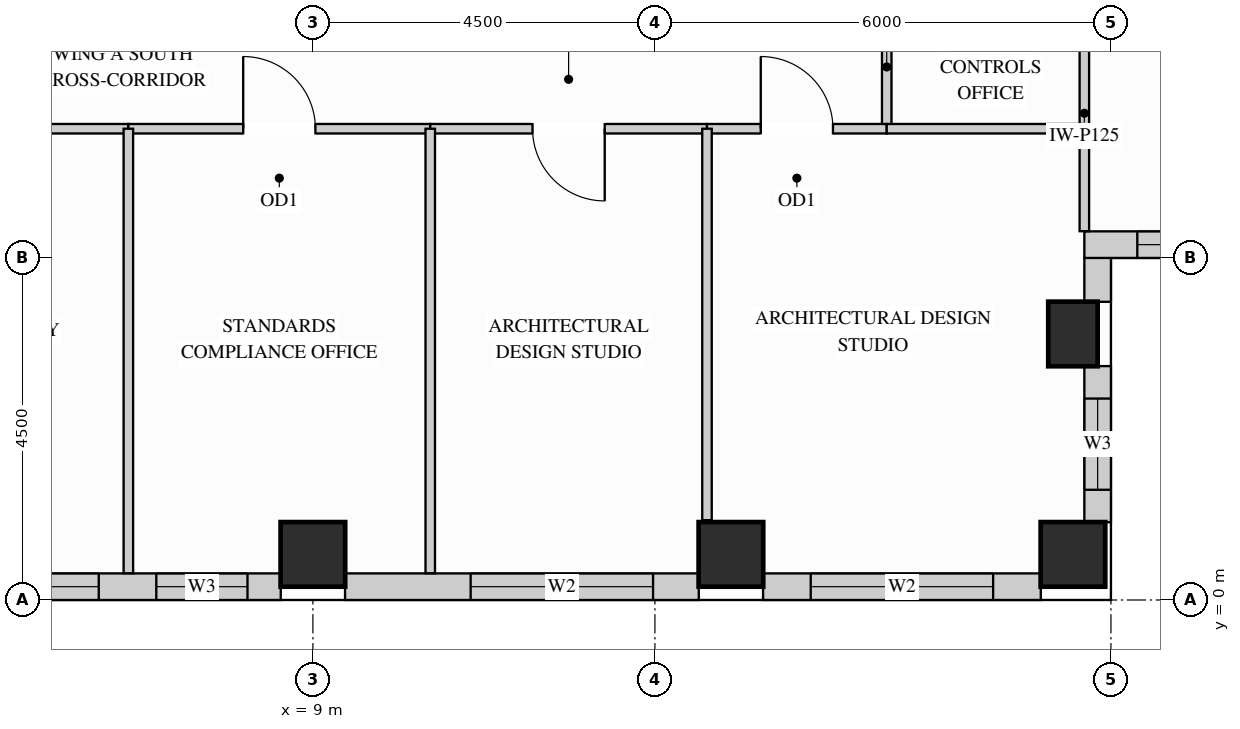
"""IFC4 building model, lengths in metres.
Left out: names, types, materials, properties, quantities, classifications, styles, units other than length and angle.
Written with IfcOpenShell. Run it as: python <this file> out.ifc"""

import sys

from ifc_helpers import new_model, si_unit, direction, frame, frame_2d, origin, origin_2d, place, context, subcontext, project, spatial, rectangle, extrude, source, transform, mapped, element, fill, save


model = new_model("IFC4")
c1 = context("Model", 3, precision=1e-05, world=origin(), true_north=direction((0.0, 1.0)))
c2 = subcontext(c1, "Body", "Model", "MODEL_VIEW")
j1 = project(units=[si_unit("LENGTHUNIT", "METRE"), si_unit("PLANEANGLEUNIT", "RADIAN")], contexts=[c1])
p1 = place(None, origin())
s1 = spatial("IfcSite", under=j1, at=p1, CompositionType="ELEMENT")
p2 = place(p1, origin())
s2 = spatial("IfcBuilding", under=s1, at=p2, CompositionType="ELEMENT")
p3 = place(p2, frame((0.0, 0.0, 219.6)))
s3 = spatial("IfcBuildingStorey", under=s2, at=p3, CompositionType="ELEMENT", Elevation=219.6)
m1 = source(origin(), c2, "Body", "SweptSolid", [
    extrude(rectangle(XDim=0.65, YDim=0.85, at=origin_2d()), origin(), (0.0, 0.0, 1.0), 3.4),
])
p4 = place(p3, frame((19.0, 3.5, 0.0), z_axis=(0.0, 0.0, 1.0), x_axis=(1.0, 0.0, 0.0)))
e1 = element("IfcColumn", 1, at=p4, inside=s3, PredefinedType="COLUMN", context=c2, shape_type="MappedRepresentation", body=[
    mapped(m1, transform((0.0, 0.0, 0.0), x_axis=(1.0, 0.0, 0.0), y_axis=(0.0, 1.0, 0.0), z_axis=(0.0, 0.0, 1.0))),
])
m2 = source(origin(), c2, "Body", "SweptSolid", [
    extrude(rectangle(XDim=0.85, YDim=0.85, at=origin_2d()), origin(), (0.0, 0.0, 1.0), 3.4),
])
for number, where, z_axis, x_axis in (
    (2, (14.5, 0.6, 0.0), (0.0, 0.0, 1.0), (1.0, 0.0, 0.0)),
    (3, (19.0, 0.6, 0.0), (0.0, 0.0, 1.0), (1.0, 0.0, 0.0)),
    (4, (9.0, 0.6, 0.0), (0.0, 0.0, 1.0), (1.0, 0.0, 0.0)),
):
    element("IfcColumn", number, at=place(p3, frame(where, z_axis=z_axis, x_axis=x_axis)), inside=s3, PredefinedType="COLUMN", context=c2, shape_type="MappedRepresentation", body=[
        mapped(m2, transform((0.0, 0.0, 0.0), x_axis=(1.0, 0.0, 0.0), y_axis=(0.0, 1.0, 0.0), z_axis=(0.0, 0.0, 1.0))),
    ])
p5 = place(p3, frame((3.923, 0.175, 0.0), z_axis=(0.0, 0.0, 1.0), x_axis=(1.0, 0.0, 0.0)))
e5 = element("IfcWall", 5, at=p5, inside=s3, PredefinedType="SOLIDWALL", context=c2, shape_type="SweptSolid", body=[
    extrude(rectangle(XDim=4.654, YDim=0.35, at=frame_2d((2.327, 0.0))), origin(), (0.0, 0.0, 1.0), 3.385),
])
p6 = place(p5, frame((0.459, 0.0, 0.78)))
e6 = element("IfcOpeningElement", 6, at=p6, cuts=e5, PredefinedType="OPENING", context=c2, shape_type="SweptSolid", body=[
    extrude(rectangle(XDim=1.8, YDim=2.1, at=frame_2d((0.9, 1.05))), frame((0.0, 0.185, 0.0), z_axis=(0.0, -1.0, 0.0), x_axis=(1.0, 0.0, 0.0)), (0.0, 0.0, 1.0), 0.37),
])
p7 = place(p5, frame((3.017, 0.0, 0.78)))
e7 = element("IfcOpeningElement", 7, at=p7, cuts=e5, PredefinedType="OPENING", context=c2, shape_type="SweptSolid", body=[
    extrude(rectangle(XDim=1.2, YDim=2.1, at=frame_2d((0.6, 1.05))), frame((0.0, 0.185, 0.0), z_axis=(0.0, -1.0, 0.0), x_axis=(1.0, 0.0, 0.0)), (0.0, 0.0, 1.0), 0.37),
])
p8 = place(p3, frame((9.423, 0.175, 0.0), z_axis=(0.0, 0.0, 1.0), x_axis=(1.0, 0.0, 0.0)))
e8 = element("IfcWall", 8, at=p8, inside=s3, PredefinedType="SOLIDWALL", context=c2, shape_type="SweptSolid", body=[
    extrude(rectangle(XDim=4.654, YDim=0.35, at=frame_2d((2.327, 0.0))), origin(), (0.0, 0.0, 1.0), 3.385),
])
p9 = place(p8, frame((1.653, 0.0, 0.78)))
e9 = element("IfcOpeningElement", 9, at=p9, cuts=e8, PredefinedType="OPENING", context=c2, shape_type="SweptSolid", body=[
    extrude(rectangle(XDim=2.4, YDim=2.1, at=frame_2d((1.2, 1.05))), frame((0.0, 0.185, 0.0), z_axis=(0.0, -1.0, 0.0), x_axis=(1.0, 0.0, 0.0)), (0.0, 0.0, 1.0), 0.37),
])
p10 = place(p3, frame((14.923, 0.175, 0.0), z_axis=(0.0, 0.0, 1.0), x_axis=(1.0, 0.0, 0.0)))
e10 = element("IfcWall", 10, at=p10, inside=s3, PredefinedType="SOLIDWALL", context=c2, shape_type="SweptSolid", body=[
    extrude(rectangle(XDim=3.654, YDim=0.35, at=frame_2d((1.827, 0.0))), origin(), (0.0, 0.0, 1.0), 3.385),
])
p11 = place(p10, frame((0.627, 0.0, 0.78)))
e11 = element("IfcOpeningElement", 11, at=p11, cuts=e10, PredefinedType="OPENING", context=c2, shape_type="SweptSolid", body=[
    extrude(rectangle(XDim=2.4, YDim=2.1, at=frame_2d((1.2, 1.05))), frame((0.0, 0.185, 0.0), z_axis=(0.0, -1.0, 0.0), x_axis=(1.0, 0.0, 0.0)), (0.0, 0.0, 1.0), 0.37),
])
p12 = place(p3, frame((19.325, 1.023, 0.0), z_axis=(0.0, 0.0, 1.0), x_axis=(0.0, 1.0, 0.0)))
e12 = element("IfcWall", 12, at=p12, inside=s3, PredefinedType="SOLIDWALL", context=c2, shape_type="SweptSolid", body=[
    extrude(rectangle(XDim=2.054, YDim=0.35, at=frame_2d((1.027, 0.0))), origin(), (0.0, 0.0, 1.0), 2.619),
])
p13 = place(p12, frame((0.427, 0.0, 0.78)))
e13 = element("IfcOpeningElement", 13, at=p13, cuts=e12, PredefinedType="OPENING", context=c2, shape_type="SweptSolid", body=[
    extrude(rectangle(XDim=1.2, YDim=1.659, at=frame_2d((0.6, 0.83))), frame((0.0, 0.185, 0.0), z_axis=(0.0, -1.0, 0.0), x_axis=(1.0, 0.0, 0.0)), (0.0, 0.0, 1.0), 0.37),
])
m3 = source(origin(), c2, "Body", "SweptSolid", [
    extrude(rectangle(XDim=0.579, YDim=0.35, at=frame_2d((0.29, 0.0))), origin(), (0.0, 0.0, 1.0), 2.773),
])
p14 = place(p3, frame((19.325, 3.923, 0.0), z_axis=(0.0, 0.0, 1.0), x_axis=(0.0, 1.0, 0.0)))
e14 = element("IfcWall", 14, at=p14, inside=s3, PredefinedType="SOLIDWALL", context=c2, shape_type="MappedRepresentation", body=[
    mapped(m3, transform((0.0, 0.0, 0.0), x_axis=(1.0, 0.0, 0.0), y_axis=(0.0, 1.0, 0.0), z_axis=(0.0, 0.0, 1.0))),
])
p15 = place(p3, frame((19.15, 4.675, 0.0), z_axis=(0.0, 0.0, 1.0), x_axis=(1.0, 0.0, 0.0)))
e15 = element("IfcWall", 15, at=p15, inside=s3, PredefinedType="SOLIDWALL", context=c2, shape_type="SweptSolid", body=[
    extrude(rectangle(XDim=15.6, YDim=0.35, at=frame_2d((7.8, 0.0))), origin(), (0.0, 0.0, 1.0), 3.385),
])
p16 = place(p15, frame((0.697, 0.0, 0.78)))
e16 = element("IfcOpeningElement", 16, at=p16, cuts=e15, PredefinedType="OPENING", context=c2, shape_type="SweptSolid", body=[
    extrude(rectangle(XDim=1.5, YDim=2.0, at=frame_2d((0.75, 1.0))), frame((0.0, 0.185, 0.0), z_axis=(0.0, -1.0, 0.0), x_axis=(1.0, 0.0, 0.0)), (0.0, 0.0, 1.0), 0.37),
])
p17 = place(p15, frame((2.573, 0.0, 0.78)))
e17 = element("IfcOpeningElement", 17, at=p17, cuts=e15, PredefinedType="OPENING", context=c2, shape_type="SweptSolid", body=[
    extrude(rectangle(XDim=1.5, YDim=2.0, at=frame_2d((0.75, 1.0))), frame((0.0, 0.185, 0.0), z_axis=(0.0, -1.0, 0.0), x_axis=(1.0, 0.0, 0.0)), (0.0, 0.0, 1.0), 0.37),
])
p18 = place(p15, frame((5.783, 0.0, 0.78)))
e18 = element("IfcOpeningElement", 18, at=p18, cuts=e15, PredefinedType="OPENING", context=c2, shape_type="SweptSolid", body=[
    extrude(rectangle(XDim=1.5, YDim=2.0, at=frame_2d((0.75, 1.0))), frame((0.0, 0.185, 0.0), z_axis=(0.0, -1.0, 0.0), x_axis=(1.0, 0.0, 0.0)), (0.0, 0.0, 1.0), 0.37),
])
p19 = place(p15, frame((8.117, 0.0, 0.78)))
e19 = element("IfcOpeningElement", 19, at=p19, cuts=e15, PredefinedType="OPENING", context=c2, shape_type="SweptSolid", body=[
    extrude(rectangle(XDim=1.5, YDim=2.0, at=frame_2d((0.75, 1.0))), frame((0.0, 0.185, 0.0), z_axis=(0.0, -1.0, 0.0), x_axis=(1.0, 0.0, 0.0)), (0.0, 0.0, 1.0), 0.37),
])
p20 = place(p15, frame((11.393, 0.0, 0.78)))
e20 = element("IfcOpeningElement", 20, at=p20, cuts=e15, PredefinedType="OPENING", context=c2, shape_type="SweptSolid", body=[
    extrude(rectangle(XDim=1.5, YDim=2.0, at=frame_2d((0.75, 1.0))), frame((0.0, 0.185, 0.0), z_axis=(0.0, -1.0, 0.0), x_axis=(1.0, 0.0, 0.0)), (0.0, 0.0, 1.0), 0.37),
])
p21 = place(p15, frame((13.337, 0.0, 0.78)))
e21 = element("IfcOpeningElement", 21, at=p21, cuts=e15, PredefinedType="OPENING", context=c2, shape_type="SweptSolid", body=[
    extrude(rectangle(XDim=1.5, YDim=2.0, at=frame_2d((0.75, 1.0))), frame((0.0, 0.185, 0.0), z_axis=(0.0, -1.0, 0.0), x_axis=(1.0, 0.0, 0.0)), (0.0, 0.0, 1.0), 0.37),
])
m4 = source(origin(), c2, "Body", "SweptSolid", [
    extrude(rectangle(XDim=3.198, YDim=0.125, at=frame_2d((1.599, 0.0))), origin(), (0.0, 0.0, 1.0), 2.773),
])
p22 = place(p3, frame((19.15, 4.852, 0.0), z_axis=(0.0, 0.0, 1.0), x_axis=(0.0, 1.0, 0.0)))
e22 = element("IfcWall", 22, at=p22, inside=s3, PredefinedType="PARTITIONING", context=c2, shape_type="MappedRepresentation", body=[
    mapped(m4, transform((0.0, 0.0, 0.0), x_axis=(1.0, 0.0, 0.0), y_axis=(0.0, 1.0, 0.0), z_axis=(0.0, 0.0, 1.0))),
])
p23 = place(p3, frame((16.55, 6.2, 0.0), z_axis=(0.0, 0.0, 1.0), x_axis=(0.0, 1.0, 0.0)))
e23 = element("IfcWall", 23, at=p23, inside=s3, PredefinedType="PARTITIONING", context=c2, shape_type="SweptSolid", body=[
    extrude(rectangle(XDim=4.4, YDim=0.125, at=frame_2d((2.2, 0.0))), origin(), (0.0, 0.0, 1.0), 3.385),
])
p24 = place(p23, frame((1.725, 0.0, 0.0)))
e24 = element("IfcOpeningElement", 24, at=p24, cuts=e23, PredefinedType="OPENING", context=c2, shape_type="SweptSolid", body=[
    extrude(rectangle(XDim=0.95, YDim=2.15, at=frame_2d((0.475, 1.075))), frame((0.0, 0.073, 0.0), z_axis=(0.0, -1.0, 0.0), x_axis=(1.0, 0.0, 0.0)), (0.0, 0.0, 1.0), 0.145),
])
p25 = place(p3, frame((2.45, 6.2, 0.0), z_axis=(0.0, 0.0, 1.0), x_axis=(1.0, 0.0, 0.0)))
e25 = element("IfcWall", 25, at=p25, inside=s3, PredefinedType="PARTITIONING", context=c2, shape_type="SweptSolid", body=[
    extrude(rectangle(XDim=4.122, YDim=0.125, at=frame_2d((2.061, 0.0))), origin(), (0.0, 0.0, 1.0), 2.848),
])
p26 = place(p25, frame((1.586, 0.0, 0.0)))
e26 = element("IfcOpeningElement", 26, at=p26, cuts=e25, PredefinedType="OPENING", context=c2, shape_type="SweptSolid", body=[
    extrude(rectangle(XDim=0.95, YDim=2.15, at=frame_2d((0.475, 1.075))), frame((0.0, 0.073, 0.0), z_axis=(0.0, -1.0, 0.0), x_axis=(1.0, 0.0, 0.0)), (0.0, 0.0, 1.0), 0.145),
])
p27 = place(p3, frame((6.572, 6.2, 0.0), z_axis=(0.0, 0.0, 1.0), x_axis=(1.0, 0.0, 0.0)))
e27 = element("IfcWall", 27, at=p27, inside=s3, PredefinedType="PARTITIONING", context=c2, shape_type="SweptSolid", body=[
    extrude(rectangle(XDim=3.972, YDim=0.125, at=frame_2d((1.986, 0.0))), origin(), (0.0, 0.0, 1.0), 2.848),
])
p28 = place(p27, frame((1.511, 0.0, 0.0)))
e28 = element("IfcOpeningElement", 28, at=p28, cuts=e27, PredefinedType="OPENING", context=c2, shape_type="SweptSolid", body=[
    extrude(rectangle(XDim=0.95, YDim=2.15, at=frame_2d((0.475, 1.075))), frame((0.0, 0.073, 0.0), z_axis=(0.0, -1.0, 0.0), x_axis=(1.0, 0.0, 0.0)), (0.0, 0.0, 1.0), 0.145),
])
p29 = place(p3, frame((10.544, 6.2, 0.0), z_axis=(0.0, 0.0, 1.0), x_axis=(1.0, 0.0, 0.0)))
e29 = element("IfcWall", 29, at=p29, inside=s3, PredefinedType="PARTITIONING", context=c2, shape_type="SweptSolid", body=[
    extrude(rectangle(XDim=3.641, YDim=0.125, at=frame_2d((1.821, 0.0))), origin(), (0.0, 0.0, 1.0), 2.848),
])
p30 = place(p29, frame((1.345, 0.0, 0.0)))
e30 = element("IfcOpeningElement", 30, at=p30, cuts=e29, PredefinedType="OPENING", context=c2, shape_type="SweptSolid", body=[
    extrude(rectangle(XDim=0.95, YDim=2.15, at=frame_2d((0.475, 1.075))), frame((0.0, 0.073, 0.0), z_axis=(0.0, -1.0, 0.0), x_axis=(1.0, 0.0, 0.0)), (0.0, 0.0, 1.0), 0.145),
])
p31 = place(p3, frame((14.185, 6.2, 0.0), z_axis=(0.0, 0.0, 1.0), x_axis=(1.0, 0.0, 0.0)))
e31 = element("IfcWall", 31, at=p31, inside=s3, PredefinedType="PARTITIONING", context=c2, shape_type="SweptSolid", body=[
    extrude(rectangle(XDim=2.365, YDim=0.125, at=frame_2d((1.183, 0.0))), origin(), (0.0, 0.0, 1.0), 2.848),
])
p32 = place(p31, frame((0.708, 0.0, 0.0)))
e32 = element("IfcOpeningElement", 32, at=p32, cuts=e31, PredefinedType="OPENING", context=c2, shape_type="SweptSolid", body=[
    extrude(rectangle(XDim=0.95, YDim=2.15, at=frame_2d((0.475, 1.075))), frame((0.0, 0.073, 0.0), z_axis=(0.0, -1.0, 0.0), x_axis=(1.0, 0.0, 0.0)), (0.0, 0.0, 1.0), 0.145),
])
m5 = source(origin(), c2, "Body", "SweptSolid", [
    extrude(rectangle(XDim=2.6, YDim=0.125, at=frame_2d((1.3, 0.0))), origin(), (0.0, 0.0, 1.0), 2.848),
])
p33 = place(p3, frame((16.55, 6.2, 0.0), z_axis=(0.0, 0.0, 1.0), x_axis=(1.0, 0.0, 0.0)))
e33 = element("IfcWall", 33, at=p33, inside=s3, PredefinedType="PARTITIONING", context=c2, shape_type="MappedRepresentation", body=[
    mapped(m5, transform((0.0, 0.0, 0.0), x_axis=(1.0, 0.0, 0.0), y_axis=(0.0, 1.0, 0.0), z_axis=(0.0, 0.0, 1.0))),
])
m6 = source(origin(), c2, "Body", "SweptSolid", [
    extrude(rectangle(XDim=5.848, YDim=0.125, at=frame_2d((2.924, 0.0))), origin(), (0.0, 0.0, 1.0), 3.385),
])
for number, where, z_axis, x_axis in (
    (34, (6.572, 0.352, 0.0), (0.0, 0.0, 1.0), (0.0, 1.0, 0.0)),
    (35, (10.544, 0.352, 0.0), (0.0, 0.0, 1.0), (0.0, 1.0, 0.0)),
):
    element("IfcWall", number, at=place(p3, frame(where, z_axis=z_axis, x_axis=x_axis)), inside=s3, PredefinedType="PARTITIONING", context=c2, shape_type="MappedRepresentation", body=[
        mapped(m6, transform((0.0, 0.0, 0.0), x_axis=(1.0, 0.0, 0.0), y_axis=(0.0, 1.0, 0.0), z_axis=(0.0, 0.0, 1.0))),
    ])
m7 = source(origin(), c2, "Body", "SweptSolid", [
    extrude(rectangle(XDim=5.15, YDim=0.125, at=frame_2d((2.575, 0.0))), origin(), (0.0, 0.0, 1.0), 3.385),
])
p34 = place(p3, frame((14.185, 1.05, 0.0), z_axis=(0.0, 0.0, 1.0), x_axis=(0.0, 1.0, 0.0)))
e36 = element("IfcWall", 36, at=p34, inside=s3, PredefinedType="PARTITIONING", context=c2, shape_type="MappedRepresentation", body=[
    mapped(m7, transform((0.0, 0.0, 0.0), x_axis=(1.0, 0.0, 0.0), y_axis=(0.0, 1.0, 0.0), z_axis=(0.0, 0.0, 1.0))),
])
m8 = source(origin(), c2, "Body", "SweptSolid", [
    extrude(rectangle(XDim=0.95, YDim=2.15, at=frame_2d((0.475, 1.075))), frame((0.0, 0.025, 0.0), z_axis=(0.0, -1.0, 0.0), x_axis=(1.0, 0.0, 0.0)), (0.0, 0.0, 1.0), 0.05),
])
p35 = place(p28, origin())
e37 = element("IfcDoor", 37, at=p35, inside=s3, OperationType="SINGLE_SWING_LEFT", PredefinedType="DOOR", context=c2, shape_type="MappedRepresentation", body=[
    mapped(m8, transform((0.0, 0.0, 0.0), x_axis=(1.0, 0.0, 0.0), y_axis=(0.0, 1.0, 0.0), z_axis=(0.0, 0.0, 1.0))),
])
fill(e28, e37)
p36 = place(p30, origin())
e38 = element("IfcDoor", 38, at=p36, inside=s3, OperationType="SINGLE_SWING_RIGHT", PredefinedType="DOOR", context=c2, shape_type="MappedRepresentation", body=[
    mapped(m8, transform((0.0, 0.0, 0.0), x_axis=(1.0, 0.0, 0.0), y_axis=(0.0, 1.0, 0.0), z_axis=(0.0, 0.0, 1.0))),
])
fill(e30, e38)
p37 = place(p32, origin())
e39 = element("IfcDoor", 39, at=p37, inside=s3, OperationType="SINGLE_SWING_LEFT", PredefinedType="DOOR", context=c2, shape_type="MappedRepresentation", body=[
    mapped(m8, transform((0.0, 0.0, 0.0), x_axis=(1.0, 0.0, 0.0), y_axis=(0.0, 1.0, 0.0), z_axis=(0.0, 0.0, 1.0))),
])
fill(e32, e39)
m9 = source(origin(), c2, "Body", "SweptSolid", [
    extrude(rectangle(XDim=1.8, YDim=2.1, at=frame_2d((0.9, 1.05))), frame((0.0, 0.03, 0.0), z_axis=(0.0, -1.0, 0.0), x_axis=(1.0, 0.0, 0.0)), (0.0, 0.0, 1.0), 0.06),
])
p38 = place(p6, origin())
e40 = element("IfcWindow", 40, at=p38, inside=s3, PartitioningType="SINGLE_PANEL", PredefinedType="WINDOW", context=c2, shape_type="MappedRepresentation", body=[
    mapped(m9, transform((0.0, 0.0, 0.0), x_axis=(1.0, 0.0, 0.0), y_axis=(0.0, 1.0, 0.0), z_axis=(0.0, 0.0, 1.0))),
])
fill(e6, e40)
m10 = source(origin(), c2, "Body", "SweptSolid", [
    extrude(rectangle(XDim=2.4, YDim=2.1, at=frame_2d((1.2, 1.05))), frame((0.0, 0.03, 0.0), z_axis=(0.0, -1.0, 0.0), x_axis=(1.0, 0.0, 0.0)), (0.0, 0.0, 1.0), 0.06),
])
p39 = place(p9, origin())
e41 = element("IfcWindow", 41, at=p39, inside=s3, PartitioningType="SINGLE_PANEL", PredefinedType="WINDOW", context=c2, shape_type="MappedRepresentation", body=[
    mapped(m10, transform((0.0, 0.0, 0.0), x_axis=(1.0, 0.0, 0.0), y_axis=(0.0, 1.0, 0.0), z_axis=(0.0, 0.0, 1.0))),
])
fill(e9, e41)
p40 = place(p11, origin())
e42 = element("IfcWindow", 42, at=p40, inside=s3, PartitioningType="SINGLE_PANEL", PredefinedType="WINDOW", context=c2, shape_type="MappedRepresentation", body=[
    mapped(m10, transform((0.0, 0.0, 0.0), x_axis=(1.0, 0.0, 0.0), y_axis=(0.0, 1.0, 0.0), z_axis=(0.0, 0.0, 1.0))),
])
fill(e11, e42)
m11 = source(origin(), c2, "Body", "SweptSolid", [
    extrude(rectangle(XDim=1.2, YDim=2.1, at=frame_2d((0.6, 1.05))), frame((0.0, 0.03, 0.0), z_axis=(0.0, -1.0, 0.0), x_axis=(1.0, 0.0, 0.0)), (0.0, 0.0, 1.0), 0.06),
])
p41 = place(p7, origin())
e43 = element("IfcWindow", 43, at=p41, inside=s3, PartitioningType="SINGLE_PANEL", PredefinedType="WINDOW", context=c2, shape_type="MappedRepresentation", body=[
    mapped(m11, transform((0.0, 0.0, 0.0), x_axis=(1.0, 0.0, 0.0), y_axis=(0.0, 1.0, 0.0), z_axis=(0.0, 0.0, 1.0))),
])
fill(e7, e43)
m12 = source(origin(), c2, "Body", "SweptSolid", [
    extrude(rectangle(XDim=1.2, YDim=1.659, at=frame_2d((0.6, 0.83))), frame((0.0, 0.03, 0.0), z_axis=(0.0, -1.0, 0.0), x_axis=(1.0, 0.0, 0.0)), (0.0, 0.0, 1.0), 0.06),
])
p42 = place(p13, origin())
e44 = element("IfcWindow", 44, at=p42, inside=s3, PartitioningType="SINGLE_PANEL", PredefinedType="WINDOW", context=c2, shape_type="MappedRepresentation", body=[
    mapped(m12, transform((0.0, 0.0, 0.0), x_axis=(1.0, 0.0, 0.0), y_axis=(0.0, 1.0, 0.0), z_axis=(0.0, 0.0, 1.0))),
])
fill(e13, e44)
m13 = source(origin(), c2, "Body", "SweptSolid", [
    extrude(rectangle(XDim=1.5, YDim=2.0, at=frame_2d((0.75, 1.0))), frame((0.0, 0.03, 0.0), z_axis=(0.0, -1.0, 0.0), x_axis=(1.0, 0.0, 0.0)), (0.0, 0.0, 1.0), 0.06),
])
p43 = place(p16, origin())
e45 = element("IfcWindow", 45, at=p43, inside=s3, PartitioningType="SINGLE_PANEL", PredefinedType="WINDOW", context=c2, shape_type="MappedRepresentation", body=[
    mapped(m13, transform((0.0, 0.0, 0.0), x_axis=(1.0, 0.0, 0.0), y_axis=(0.0, 1.0, 0.0), z_axis=(0.0, 0.0, 1.0))),
])
fill(e16, e45)
save(model, sys.argv[1])
